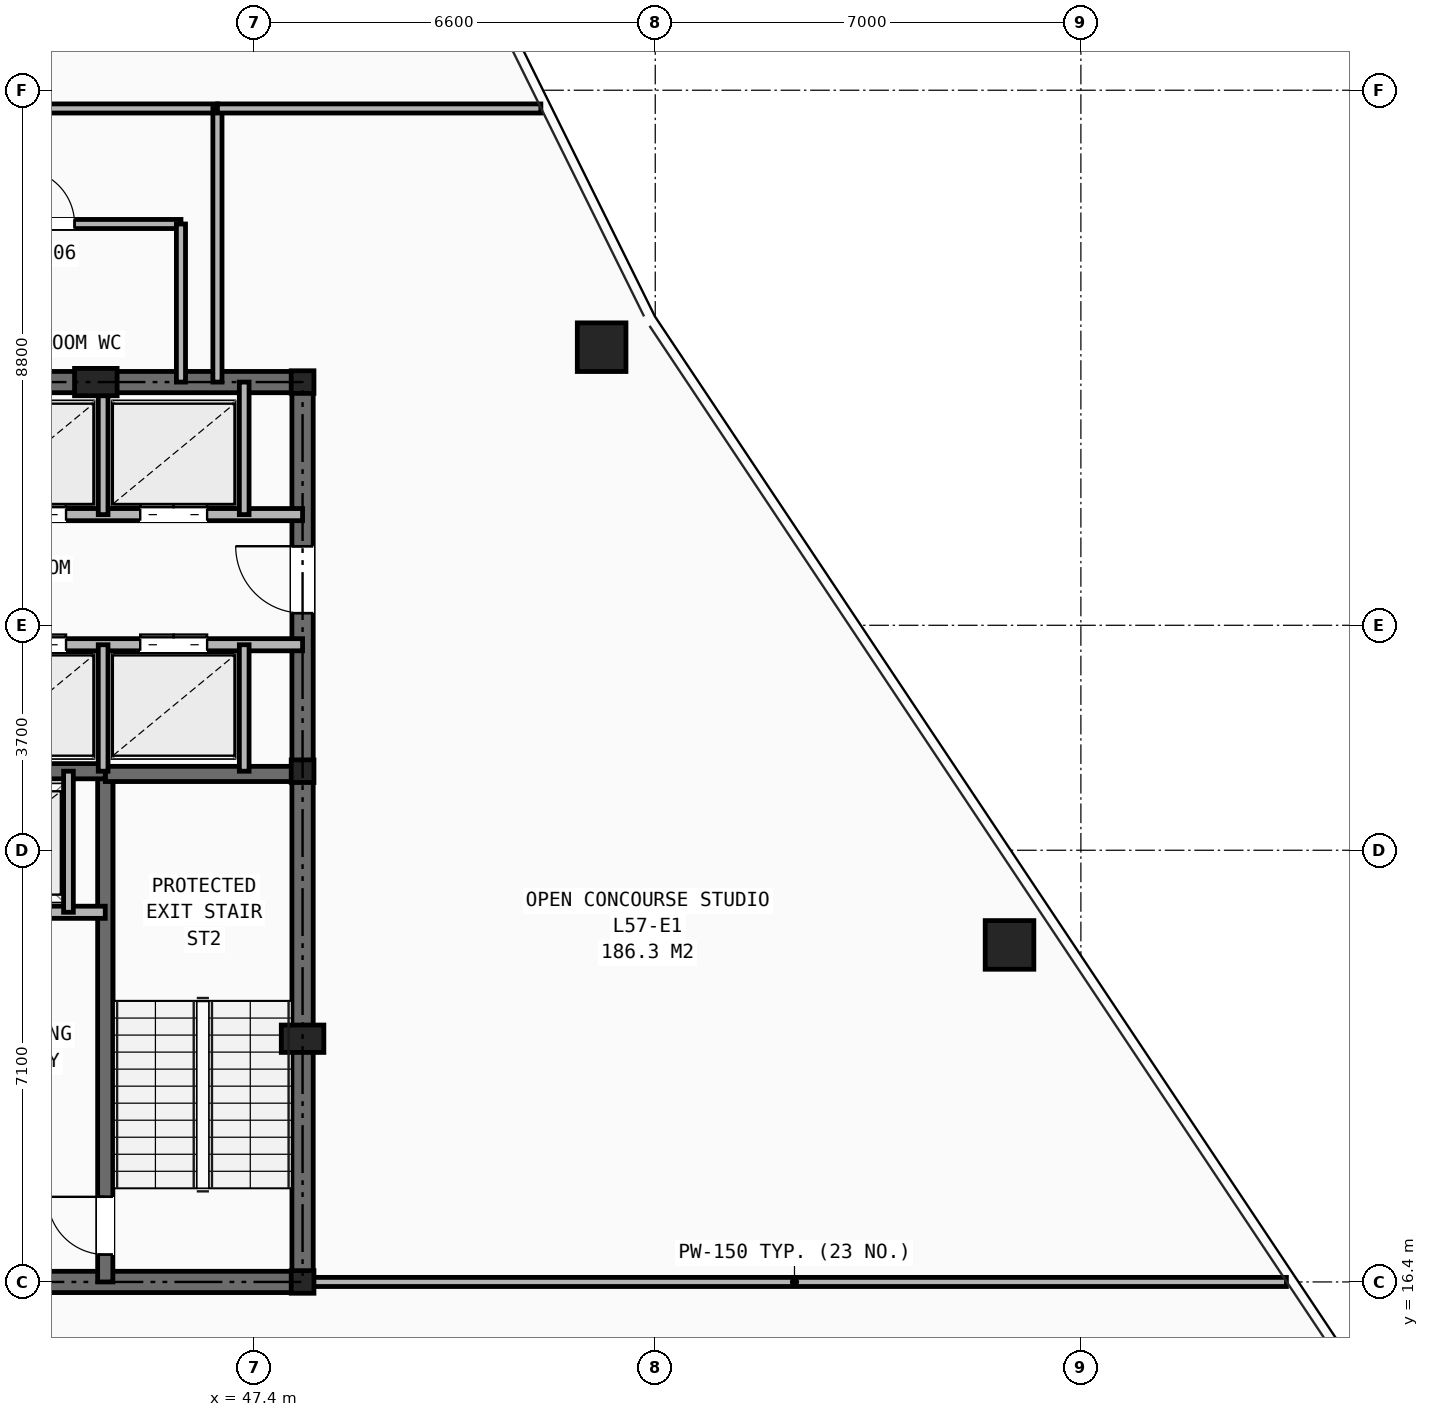
"""IFC4 building model, lengths in metres.
Left out: names, types, materials, properties, quantities, classifications, styles, units other than length and angle.
Written with IfcOpenShell. Run it as: python <this file> out.ifc"""

import sys

from ifc_helpers import new_model, si_unit, direction, frame, frame_2d, origin, origin_2d, place, context, subcontext, project, spatial, rectangle, hollow_rectangle, i_section, extrude, element, fill, save


model = new_model("IFC4")
c1 = context("Model", 3, precision=1e-05, world=origin(), true_north=direction((0.0, 1.0)))
c2 = subcontext(c1, "Body", "Model", "MODEL_VIEW")
j1 = project(units=[si_unit("LENGTHUNIT", "METRE"), si_unit("PLANEANGLEUNIT", "RADIAN")], contexts=[c1])
p1 = place(None, origin())
s1 = spatial("IfcSite", under=j1, at=p1, CompositionType="ELEMENT")
p2 = place(p1, origin())
s2 = spatial("IfcBuilding", under=s1, at=p2, CompositionType="ELEMENT")
p3 = place(p2, frame((0.0, 0.0, 200.7)))
s3 = spatial("IfcBuildingStorey", under=s2, at=p3, CompositionType="ELEMENT", Elevation=200.7)
for number, where, z_axis, x_axis in (
    (1, (48.2, 16.4, 0.0), (0.0, 0.0, 1.0), (1.0, 0.0, 0.0)),
    (2, (48.2, 24.8, 0.0), (0.0, 0.0, 1.0), (1.0, 0.0, 0.0)),
    (3, (48.2, 31.2, 0.0), (0.0, 0.0, 1.0), (1.0, 0.0, 0.0)),
):
    element("IfcColumn", number, at=place(p3, frame(where, z_axis=z_axis, x_axis=x_axis)), inside=s3, PredefinedType="COLUMN", context=c2, shape_type="SweptSolid", body=[
        extrude(i_section(OverallWidth=0.374, OverallDepth=0.372, WebThickness=0.016, FlangeThickness=0.026, at=origin_2d()), origin(), (0.0, 0.0, 1.0), 4.2),
    ])
for number, where, z_axis, x_axis in (
    (4, (48.2, 20.4, 0.0), (0.0, 0.0, 1.0), (1.0, 0.0, 0.0)),
    (5, (44.8, 31.2, 0.0), (0.0, 0.0, 1.0), (1.0, 0.0, 0.0)),
):
    element("IfcColumn", number, at=place(p3, frame(where, z_axis=z_axis, x_axis=x_axis)), inside=s3, PredefinedType="PILASTER", context=c2, shape_type="SweptSolid", body=[
        extrude(rectangle(XDim=0.7, YDim=0.45, at=origin_2d()), origin(), (0.0, 0.0, 1.0), 4.2),
    ])
for number, where, z_axis, x_axis in (
    (6, (59.826, 21.943, 0.0), (0.0, 0.0, 1.0), (1.0, 0.0, 0.0)),
    (7, (53.118, 31.774, 0.0), (0.0, 0.0, 1.0), (1.0, 0.0, 0.0)),
):
    element("IfcColumn", number, at=place(p3, frame(where, z_axis=z_axis, x_axis=x_axis)), inside=s3, PredefinedType="COLUMN", context=c2, shape_type="SweptSolid", body=[
        extrude(hollow_rectangle(XDim=0.8, YDim=0.8, WallThickness=0.055, at=origin_2d()), origin(), (0.0, 0.0, 1.0), 4.2),
    ])
p4 = place(p3, frame((31.8, 16.4, 0.0), z_axis=(0.0, 0.0, 1.0), x_axis=(1.0, 0.0, 0.0)))
e8 = element("IfcWall", 8, at=p4, inside=s3, PredefinedType="SHEAR", context=c2, shape_type="SweptSolid", body=[
    extrude(rectangle(XDim=16.4, YDim=0.35, at=frame_2d((8.2, 0.0))), origin(), (0.0, 0.0, 1.0), 3.95),
])
p5 = place(p4, frame((7.75, 0.0, 0.0)))
e9 = element("IfcOpeningElement", 9, at=p5, cuts=e8, PredefinedType="OPENING", context=c2, shape_type="SweptSolid", body=[
    extrude(rectangle(XDim=0.9, YDim=2.1, at=frame_2d((0.45, 1.05))), frame((0.0, 0.185, 0.0), z_axis=(0.0, -1.0, 0.0), x_axis=(1.0, 0.0, 0.0)), (0.0, 0.0, 1.0), 0.37),
])
p6 = place(p4, frame((4.2, 0.0, 0.0)))
e10 = element("IfcOpeningElement", 10, at=p6, cuts=e8, PredefinedType="OPENING", context=c2, shape_type="SweptSolid", body=[
    extrude(rectangle(XDim=0.95, YDim=2.1, at=frame_2d((0.475, 1.05))), frame((0.0, 0.185, 0.0), z_axis=(0.0, -1.0, 0.0), x_axis=(1.0, 0.0, 0.0)), (0.0, 0.0, 1.0), 0.37),
])
p7 = place(p4, frame((10.6, 0.0, 0.0)))
e11 = element("IfcOpeningElement", 11, at=p7, cuts=e8, PredefinedType="OPENING", context=c2, shape_type="SweptSolid", body=[
    extrude(rectangle(XDim=0.95, YDim=2.1, at=frame_2d((0.475, 1.05))), frame((0.0, 0.185, 0.0), z_axis=(0.0, -1.0, 0.0), x_axis=(1.0, 0.0, 0.0)), (0.0, 0.0, 1.0), 0.37),
])
p8 = place(p3, frame((31.8, 31.2, 0.0), z_axis=(0.0, 0.0, 1.0), x_axis=(1.0, 0.0, 0.0)))
e12 = element("IfcWall", 12, at=p8, inside=s3, PredefinedType="SHEAR", context=c2, shape_type="SweptSolid", body=[
    extrude(rectangle(XDim=16.4, YDim=0.35, at=frame_2d((8.2, 0.0))), origin(), (0.0, 0.0, 1.0), 3.95),
])
p9 = place(p3, frame((48.2, 16.4, 0.0), z_axis=(0.0, 0.0, 1.0), x_axis=(0.0, 1.0, 0.0)))
e13 = element("IfcWall", 13, at=p9, inside=s3, PredefinedType="SHEAR", context=c2, shape_type="SweptSolid", body=[
    extrude(rectangle(XDim=14.8, YDim=0.35, at=frame_2d((7.4, 0.0))), origin(), (0.0, 0.0, 1.0), 3.95),
])
p10 = place(p9, frame((11.0, 0.0, 0.0)))
e14 = element("IfcOpeningElement", 14, at=p10, cuts=e13, PredefinedType="OPENING", context=c2, shape_type="SweptSolid", body=[
    extrude(rectangle(XDim=1.1, YDim=2.15, at=frame_2d((0.55, 1.075))), frame((0.0, 0.185, 0.0), z_axis=(0.0, -1.0, 0.0), x_axis=(1.0, 0.0, 0.0)), (0.0, 0.0, 1.0), 0.37),
])
p11 = place(p3, frame((44.955, 16.4, 0.0), z_axis=(0.0, 0.0, 1.0), x_axis=(0.0, 1.0, 0.0)))
e15 = element("IfcWall", 15, at=p11, inside=s3, PredefinedType="SHEAR", context=c2, shape_type="SweptSolid", body=[
    extrude(rectangle(XDim=8.4, YDim=0.25, at=frame_2d((4.2, 0.0))), origin(), (0.0, 0.0, 1.0), 3.95),
])
p12 = place(p11, frame((0.45, 0.0, 0.0)))
e16 = element("IfcOpeningElement", 16, at=p12, cuts=e15, PredefinedType="OPENING", context=c2, shape_type="SweptSolid", body=[
    extrude(rectangle(XDim=0.95, YDim=2.1, at=frame_2d((0.475, 1.05))), frame((0.0, 0.135, 0.0), z_axis=(0.0, -1.0, 0.0), x_axis=(1.0, 0.0, 0.0)), (0.0, 0.0, 1.0), 0.27),
])
p13 = place(p3, frame((44.955, 24.755, 0.0), z_axis=(0.0, 0.0, 1.0), x_axis=(1.0, 0.0, 0.0)))
e17 = element("IfcWall", 17, at=p13, inside=s3, PredefinedType="SHEAR", context=c2, shape_type="SweptSolid", body=[
    extrude(rectangle(XDim=3.245, YDim=0.25, at=frame_2d((1.623, 0.0))), origin(), (0.0, 0.0, 1.0), 3.95),
])
p14 = place(p3, frame((35.045, 24.8, 0.0), z_axis=(0.0, 0.0, 1.0), x_axis=(1.0, 0.0, 0.0)))
e18 = element("IfcWall", 18, at=p14, inside=s3, PredefinedType="SHEAR", context=c2, shape_type="SweptSolid", body=[
    extrude(rectangle(XDim=9.91, YDim=0.25, at=frame_2d((4.955, 0.0))), origin(), (0.0, 0.0, 1.0), 3.95),
])
p15 = place(p3, frame((35.045, 22.48, 0.0), z_axis=(0.0, 0.0, 1.0), x_axis=(1.0, 0.0, 0.0)))
e19 = element("IfcWall", 19, at=p15, inside=s3, PredefinedType="SOLIDWALL", context=c2, shape_type="SweptSolid", body=[
    extrude(rectangle(XDim=9.91, YDim=0.2, at=frame_2d((4.955, 0.0))), origin(), (0.0, 0.0, 1.0), 3.95),
])
p16 = place(p15, frame((1.255, 0.0, 0.0)))
e20 = element("IfcOpeningElement", 20, at=p16, cuts=e19, PredefinedType="OPENING", context=c2, shape_type="SweptSolid", body=[
    extrude(rectangle(XDim=1.1, YDim=2.15, at=frame_2d((0.55, 1.075))), frame((0.0, 0.11, 0.0), z_axis=(0.0, -1.0, 0.0), x_axis=(1.0, 0.0, 0.0)), (0.0, 0.0, 1.0), 0.22),
])
p17 = place(p15, frame((7.555, 0.0, 0.0)))
e21 = element("IfcOpeningElement", 21, at=p17, cuts=e19, PredefinedType="OPENING", context=c2, shape_type="SweptSolid", body=[
    extrude(rectangle(XDim=1.1, YDim=2.15, at=frame_2d((0.55, 1.075))), frame((0.0, 0.11, 0.0), z_axis=(0.0, -1.0, 0.0), x_axis=(1.0, 0.0, 0.0)), (0.0, 0.0, 1.0), 0.22),
])
p18 = place(p15, frame((4.405, 0.0, 0.0)))
e22 = element("IfcOpeningElement", 22, at=p18, cuts=e19, PredefinedType="OPENING", context=c2, shape_type="SweptSolid", body=[
    extrude(rectangle(XDim=1.1, YDim=2.15, at=frame_2d((0.55, 1.075))), frame((0.0, 0.11, 0.0), z_axis=(0.0, -1.0, 0.0), x_axis=(1.0, 0.0, 0.0)), (0.0, 0.0, 1.0), 0.22),
])
p19 = place(p3, frame((44.35, 22.48, 0.0), z_axis=(0.0, 0.0, 1.0), x_axis=(0.0, 1.0, 0.0)))
e23 = element("IfcWall", 23, at=p19, inside=s3, PredefinedType="SOLIDWALL", context=c2, shape_type="SweptSolid", body=[
    extrude(rectangle(XDim=2.32, YDim=0.16, at=frame_2d((1.16, 0.0))), origin(), (0.0, 0.0, 1.0), 3.95),
])
p20 = place(p3, frame((31.8, 29.02, 0.0), z_axis=(0.0, 0.0, 1.0), x_axis=(1.0, 0.0, 0.0)))
e24 = element("IfcWall", 24, at=p20, inside=s3, PredefinedType="SOLIDWALL", context=c2, shape_type="SweptSolid", body=[
    extrude(rectangle(XDim=16.4, YDim=0.2, at=frame_2d((8.2, 0.0))), origin(), (0.0, 0.0, 1.0), 3.405),
])
p21 = place(p20, frame((0.55, 0.0, 0.0)))
e25 = element("IfcOpeningElement", 25, at=p21, cuts=e24, PredefinedType="OPENING", context=c2, shape_type="SweptSolid", body=[
    extrude(rectangle(XDim=0.85, YDim=2.05, at=frame_2d((0.425, 1.025))), frame((0.0, 0.11, 0.0), z_axis=(0.0, -1.0, 0.0), x_axis=(1.0, 0.0, 0.0)), (0.0, 0.0, 1.0), 0.22),
])
p22 = place(p20, frame((5.94, 0.0, 0.0)))
e26 = element("IfcOpeningElement", 26, at=p22, cuts=e24, PredefinedType="OPENING", context=c2, shape_type="SweptSolid", body=[
    extrude(rectangle(XDim=0.9, YDim=2.1, at=frame_2d((0.45, 1.05))), frame((0.0, 0.11, 0.0), z_axis=(0.0, -1.0, 0.0), x_axis=(1.0, 0.0, 0.0)), (0.0, 0.0, 1.0), 0.22),
])
p23 = place(p20, frame((11.41, 0.0, 0.0)))
e27 = element("IfcOpeningElement", 27, at=p23, cuts=e24, PredefinedType="OPENING", context=c2, shape_type="SweptSolid", body=[
    extrude(rectangle(XDim=1.1, YDim=2.15, at=frame_2d((0.55, 1.075))), frame((0.0, 0.11, 0.0), z_axis=(0.0, -1.0, 0.0), x_axis=(1.0, 0.0, 0.0)), (0.0, 0.0, 1.0), 0.22),
])
p24 = place(p20, frame((13.73, 0.0, 0.0)))
e28 = element("IfcOpeningElement", 28, at=p24, cuts=e24, PredefinedType="OPENING", context=c2, shape_type="SweptSolid", body=[
    extrude(rectangle(XDim=1.1, YDim=2.15, at=frame_2d((0.55, 1.075))), frame((0.0, 0.11, 0.0), z_axis=(0.0, -1.0, 0.0), x_axis=(1.0, 0.0, 0.0)), (0.0, 0.0, 1.0), 0.22),
])
p25 = place(p3, frame((33.82, 26.88, 0.0), z_axis=(0.0, 0.0, 1.0), x_axis=(1.0, 0.0, 0.0)))
e29 = element("IfcWall", 29, at=p25, inside=s3, PredefinedType="SOLIDWALL", context=c2, shape_type="SweptSolid", body=[
    extrude(rectangle(XDim=14.38, YDim=0.2, at=frame_2d((7.19, 0.0))), origin(), (0.0, 0.0, 1.0), 3.405),
])
p26 = place(p25, frame((9.39, 0.0, 0.0)))
e30 = element("IfcOpeningElement", 30, at=p26, cuts=e29, PredefinedType="OPENING", context=c2, shape_type="SweptSolid", body=[
    extrude(rectangle(XDim=1.1, YDim=2.15, at=frame_2d((0.55, 1.075))), frame((0.0, 0.11, 0.0), z_axis=(0.0, -1.0, 0.0), x_axis=(1.0, 0.0, 0.0)), (0.0, 0.0, 1.0), 0.22),
])
p27 = place(p25, frame((11.71, 0.0, 0.0)))
e31 = element("IfcOpeningElement", 31, at=p27, cuts=e29, PredefinedType="OPENING", context=c2, shape_type="SweptSolid", body=[
    extrude(rectangle(XDim=1.1, YDim=2.15, at=frame_2d((0.55, 1.075))), frame((0.0, 0.11, 0.0), z_axis=(0.0, -1.0, 0.0), x_axis=(1.0, 0.0, 0.0)), (0.0, 0.0, 1.0), 0.22),
])
for number, where, z_axis, x_axis in (
    (32, (44.92, 29.02, 0.0), (0.0, 0.0, 1.0), (0.0, 1.0, 0.0)),
    (33, (47.24, 29.02, 0.0), (0.0, 0.0, 1.0), (0.0, 1.0, 0.0)),
):
    element("IfcWall", number, at=place(p3, frame(where, z_axis=z_axis, x_axis=x_axis)), inside=s3, PredefinedType="SOLIDWALL", context=c2, shape_type="SweptSolid", body=[
        extrude(rectangle(XDim=2.18, YDim=0.16, at=frame_2d((1.09, 0.0))), origin(), (0.0, 0.0, 1.0), 3.405),
    ])
for number, where, z_axis, x_axis in (
    (34, (44.92, 24.8, 0.0), (0.0, 0.0, 1.0), (0.0, 1.0, 0.0)),
    (35, (47.24, 24.8, 0.0), (0.0, 0.0, 1.0), (0.0, 1.0, 0.0)),
):
    element("IfcWall", number, at=place(p3, frame(where, z_axis=z_axis, x_axis=x_axis)), inside=s3, PredefinedType="SOLIDWALL", context=c2, shape_type="SweptSolid", body=[
        extrude(rectangle(XDim=2.08, YDim=0.16, at=frame_2d((1.04, 0.0))), origin(), (0.0, 0.0, 1.0), 3.95),
    ])
p28 = place(p3, frame((33.2, 33.8, 0.0), z_axis=(0.0, 0.0, 1.0), x_axis=(1.0, 0.0, 0.0)))
e36 = element("IfcWall", 36, at=p28, inside=s3, PredefinedType="PARTITIONING", context=c2, shape_type="SweptSolid", body=[
    extrude(rectangle(XDim=13.0, YDim=0.15, at=frame_2d((6.5, 0.0))), origin(), (0.0, 0.0, 1.0), 3.95),
])
p29 = place(p28, frame((1.7, 0.0, 0.0)))
e37 = element("IfcOpeningElement", 37, at=p29, cuts=e36, PredefinedType="OPENING", context=c2, shape_type="SweptSolid", body=[
    extrude(rectangle(XDim=0.9, YDim=2.1, at=frame_2d((0.45, 1.05))), frame((0.0, 0.085, 0.0), z_axis=(0.0, -1.0, 0.0), x_axis=(1.0, 0.0, 0.0)), (0.0, 0.0, 1.0), 0.17),
])
p30 = place(p28, frame((6.0, 0.0, 0.0)))
e38 = element("IfcOpeningElement", 38, at=p30, cuts=e36, PredefinedType="OPENING", context=c2, shape_type="SweptSolid", body=[
    extrude(rectangle(XDim=0.9, YDim=2.1, at=frame_2d((0.45, 1.05))), frame((0.0, 0.085, 0.0), z_axis=(0.0, -1.0, 0.0), x_axis=(1.0, 0.0, 0.0)), (0.0, 0.0, 1.0), 0.17),
])
p31 = place(p28, frame((10.35, 0.0, 0.0)))
e39 = element("IfcOpeningElement", 39, at=p31, cuts=e36, PredefinedType="OPENING", context=c2, shape_type="SweptSolid", body=[
    extrude(rectangle(XDim=0.9, YDim=2.1, at=frame_2d((0.45, 1.05))), frame((0.0, 0.085, 0.0), z_axis=(0.0, -1.0, 0.0), x_axis=(1.0, 0.0, 0.0)), (0.0, 0.0, 1.0), 0.17),
])
p32 = place(p3, frame((46.2, 31.2, 0.0), z_axis=(0.0, 0.0, 1.0), x_axis=(0.0, 1.0, 0.0)))
e40 = element("IfcWall", 40, at=p32, inside=s3, PredefinedType="PARTITIONING", context=c2, shape_type="SweptSolid", body=[
    extrude(rectangle(XDim=2.6, YDim=0.15, at=frame_2d((1.3, 0.0))), origin(), (0.0, 0.0, 1.0), 3.405),
])
p33 = place(p3, frame((48.2, 16.4, 0.0), z_axis=(0.0, 0.0, 1.0), x_axis=(1.0, 0.0, 0.0)))
e41 = element("IfcWall", 41, at=p33, inside=s3, PredefinedType="PARTITIONING", context=c2, shape_type="SweptSolid", body=[
    extrude(rectangle(XDim=16.18, YDim=0.15, at=frame_2d((8.09, 0.0))), origin(), (0.0, 0.0, 1.0), 2.965),
])
p34 = place(p3, frame((40.75, 35.7, 0.0), z_axis=(0.0, 0.0, 1.0), x_axis=(1.0, 0.0, 0.0)))
e42 = element("IfcWall", 42, at=p34, inside=s3, PredefinedType="PARTITIONING", context=c2, shape_type="SweptSolid", body=[
    extrude(rectangle(XDim=6.05, YDim=0.15, at=frame_2d((3.025, 0.0))), origin(), (0.0, 0.0, 1.0), 3.95),
])
p35 = place(p34, frame((0.2, 0.0, 0.0)))
e43 = element("IfcOpeningElement", 43, at=p35, cuts=e42, PredefinedType="OPENING", context=c2, shape_type="SweptSolid", body=[
    extrude(rectangle(XDim=0.95, YDim=2.1, at=frame_2d((0.475, 1.05))), frame((0.0, 0.085, 0.0), z_axis=(0.0, -1.0, 0.0), x_axis=(1.0, 0.0, 0.0)), (0.0, 0.0, 1.0), 0.17),
])
p36 = place(p3, frame((46.8, 31.2, 0.0), z_axis=(0.0, 0.0, 1.0), x_axis=(0.0, 1.0, 0.0)))
e44 = element("IfcWall", 44, at=p36, inside=s3, PredefinedType="PARTITIONING", context=c2, shape_type="SweptSolid", body=[
    extrude(rectangle(XDim=4.5, YDim=0.15, at=frame_2d((2.25, 0.0))), origin(), (0.0, 0.0, 1.0), 3.405),
])
p37 = place(p3, frame((46.8, 35.7, 0.0), z_axis=(0.0, 0.0, 1.0), x_axis=(1.0, 0.0, 0.0)))
e45 = element("IfcWall", 45, at=p37, inside=s3, PredefinedType="PARTITIONING", context=c2, shape_type="SweptSolid", body=[
    extrude(rectangle(XDim=5.319, YDim=0.15, at=frame_2d((2.659, 0.0))), origin(), (0.0, 0.0, 1.0), 3.329),
])
p38 = place(p12, origin())
e46 = element("IfcDoor", 46, at=p38, inside=s3, OperationType="SINGLE_SWING_RIGHT", PredefinedType="DOOR", context=c2, shape_type="SweptSolid", body=[
    extrude(rectangle(XDim=0.95, YDim=2.1, at=frame_2d((0.475, 1.05))), frame((0.0, 0.025, 0.0), z_axis=(0.0, -1.0, 0.0), x_axis=(1.0, 0.0, 0.0)), (0.0, 0.0, 1.0), 0.05),
])
fill(e16, e46)
p39 = place(p10, origin())
e47 = element("IfcDoor", 47, at=p39, inside=s3, OperationType="SINGLE_SWING_RIGHT", PredefinedType="DOOR", context=c2, shape_type="SweptSolid", body=[
    extrude(rectangle(XDim=1.1, YDim=2.15, at=frame_2d((0.55, 1.075))), frame((0.0, 0.025, 0.0), z_axis=(0.0, -1.0, 0.0), x_axis=(1.0, 0.0, 0.0)), (0.0, 0.0, 1.0), 0.05),
])
fill(e14, e47)
p40 = place(p23, origin())
e48 = element("IfcDoor", 48, at=p40, inside=s3, OperationType="DOUBLE_DOOR_SLIDING", PredefinedType="DOOR", context=c2, shape_type="SweptSolid", body=[
    extrude(rectangle(XDim=1.1, YDim=2.15, at=frame_2d((0.55, 1.075))), frame((0.0, 0.025, 0.0), z_axis=(0.0, -1.0, 0.0), x_axis=(1.0, 0.0, 0.0)), (0.0, 0.0, 1.0), 0.05),
])
fill(e27, e48)
p41 = place(p24, origin())
e49 = element("IfcDoor", 49, at=p41, inside=s3, OperationType="DOUBLE_DOOR_SLIDING", PredefinedType="DOOR", context=c2, shape_type="SweptSolid", body=[
    extrude(rectangle(XDim=1.1, YDim=2.15, at=frame_2d((0.55, 1.075))), frame((0.0, 0.025, 0.0), z_axis=(0.0, -1.0, 0.0), x_axis=(1.0, 0.0, 0.0)), (0.0, 0.0, 1.0), 0.05),
])
fill(e28, e49)
p42 = place(p26, origin())
e50 = element("IfcDoor", 50, at=p42, inside=s3, OperationType="DOUBLE_DOOR_SLIDING", PredefinedType="DOOR", context=c2, shape_type="SweptSolid", body=[
    extrude(rectangle(XDim=1.1, YDim=2.15, at=frame_2d((0.55, 1.075))), frame((0.0, 0.025, 0.0), z_axis=(0.0, -1.0, 0.0), x_axis=(1.0, 0.0, 0.0)), (0.0, 0.0, 1.0), 0.05),
])
fill(e30, e50)
p43 = place(p27, origin())
e51 = element("IfcDoor", 51, at=p43, inside=s3, OperationType="DOUBLE_DOOR_SLIDING", PredefinedType="DOOR", context=c2, shape_type="SweptSolid", body=[
    extrude(rectangle(XDim=1.1, YDim=2.15, at=frame_2d((0.55, 1.075))), frame((0.0, 0.025, 0.0), z_axis=(0.0, -1.0, 0.0), x_axis=(1.0, 0.0, 0.0)), (0.0, 0.0, 1.0), 0.05),
])
fill(e31, e51)
p44 = place(p31, origin())
e52 = element("IfcDoor", 52, at=p44, inside=s3, OperationType="SINGLE_SWING_LEFT", PredefinedType="DOOR", context=c2, shape_type="SweptSolid", body=[
    extrude(rectangle(XDim=0.9, YDim=2.1, at=frame_2d((0.45, 1.05))), frame((0.0, 0.025, 0.0), z_axis=(0.0, -1.0, 0.0), x_axis=(1.0, 0.0, 0.0)), (0.0, 0.0, 1.0), 0.05),
])
fill(e39, e52)
save(model, sys.argv[1])
